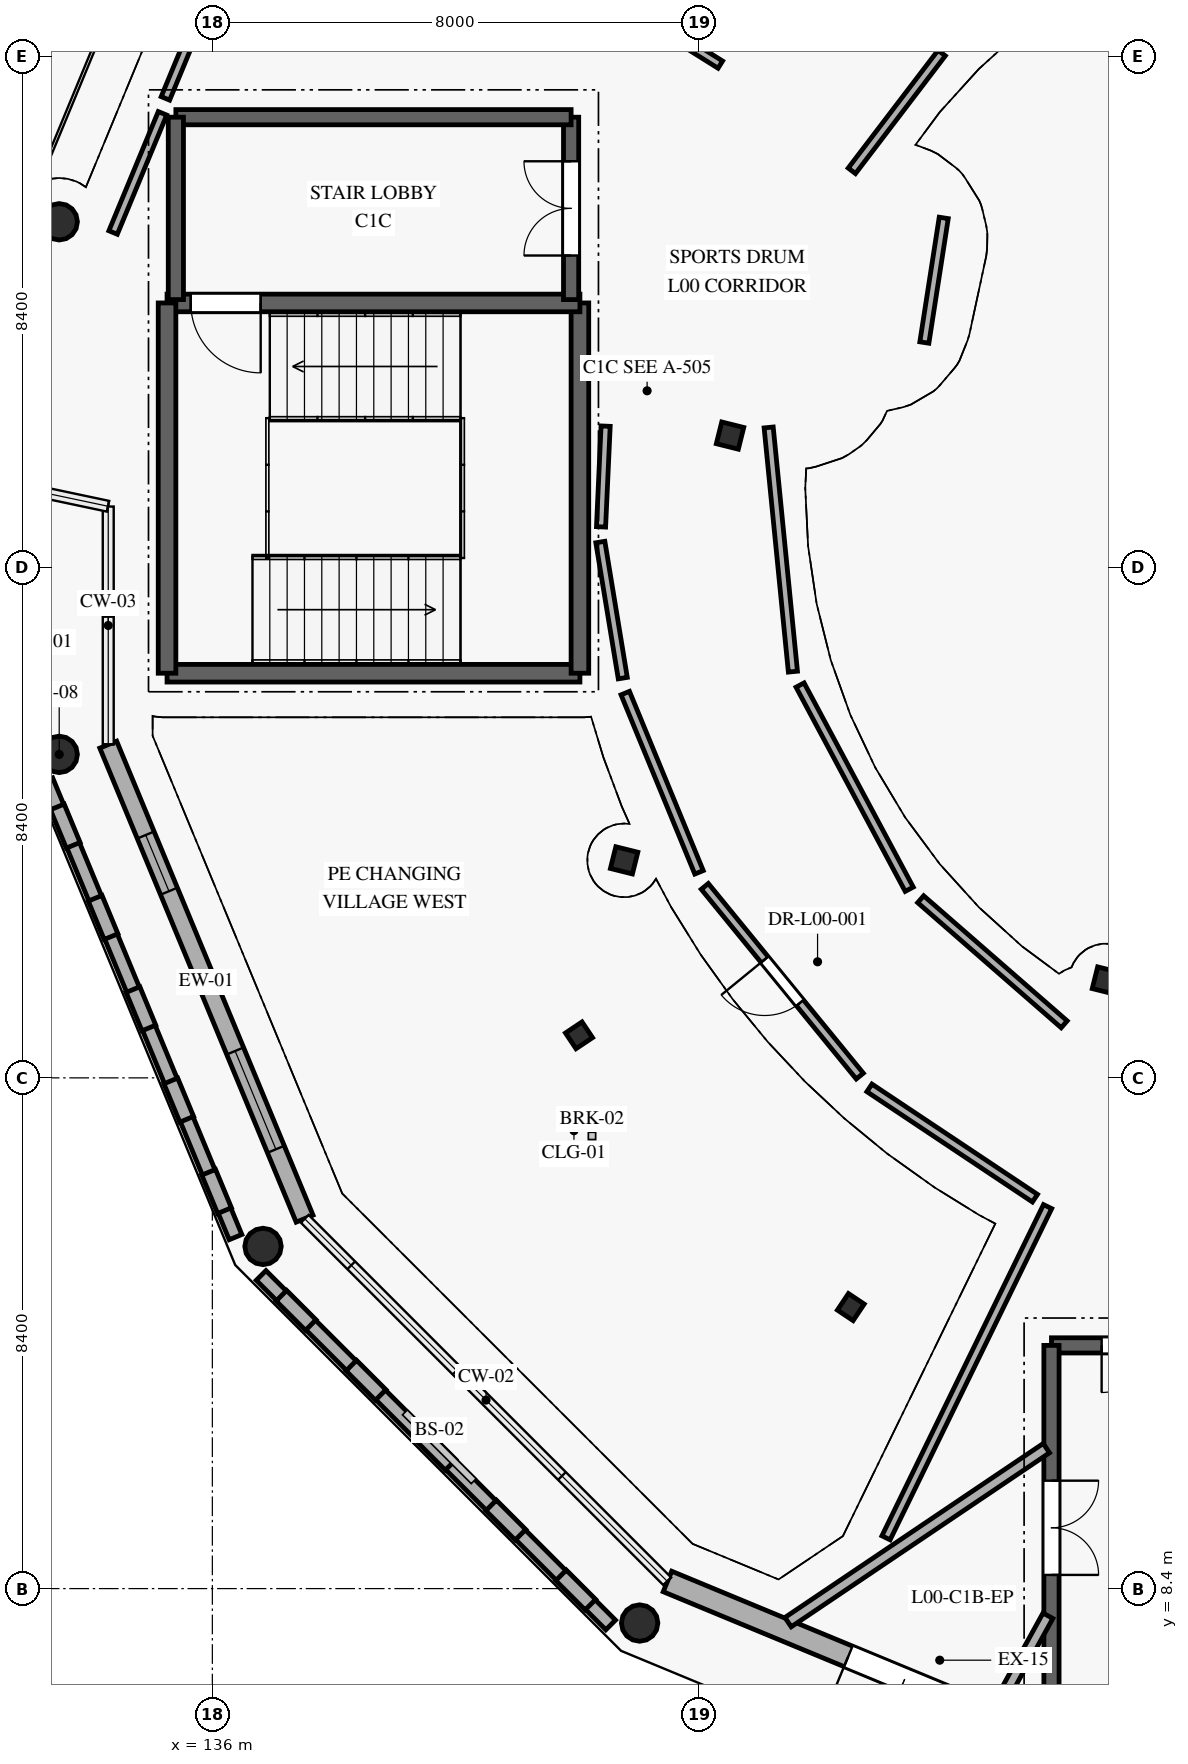
"""IFC4 building model, lengths in metres.
Left out: names, types, materials, properties, quantities, classifications, styles, units other than length and angle.
Written with IfcOpenShell. Run it as: python <this file> out.ifc"""

import sys

from ifc_helpers import new_model, si_unit, direction, frame, frame_2d, origin, origin_2d, place, context, subcontext, project, spatial, rectangle, circle, i_section, extrude, element, fill, save


model = new_model("IFC4")
c1 = context("Model", 3, precision=1e-05, world=origin(), true_north=direction((0.0, 1.0)))
c2 = subcontext(c1, "Body", "Model", "MODEL_VIEW")
j1 = project(units=[si_unit("LENGTHUNIT", "METRE"), si_unit("PLANEANGLEUNIT", "RADIAN")], contexts=[c1])
p1 = place(None, origin())
s1 = spatial("IfcSite", under=j1, at=p1, CompositionType="ELEMENT")
p2 = place(p1, origin())
s2 = spatial("IfcBuilding", under=s1, at=p2, CompositionType="ELEMENT")
p3 = place(p2, origin())
s3 = spatial("IfcBuildingStorey", under=s2, at=p3, CompositionType="ELEMENT", Elevation=0.0)
for number, where, z_axis, x_axis in (
    (1, (142.772, 20.377, 0.0), (0.0, 0.0, 1.0), (0.97, -0.242, 0.0)),
    (2, (144.514, 27.364, 0.0), (0.0, 0.0, 1.0), (0.97, -0.242, 0.0)),
    (3, (150.696, 18.402, 0.0), (0.0, 0.0, 1.0), (0.97, -0.242, 0.0)),
):
    element("IfcColumn", number, at=place(p3, frame(where, z_axis=z_axis, x_axis=x_axis)), inside=s3, PredefinedType="COLUMN", context=c2, shape_type="SweptSolid", body=[
        extrude(i_section(OverallWidth=0.373, OverallDepth=0.368, WebThickness=0.014, FlangeThickness=0.024, FilletRadius=0.015, at=origin_2d()), origin(), (0.0, 0.0, 1.0), 4.2),
    ])
for number, where, z_axis, x_axis in (
    (4, (133.481, 30.88, 0.0), (0.0, 0.0, 1.0), (-0.195, -0.981, 0.0)),
    (5, (133.481, 22.12, 0.0), (0.0, 0.0, 1.0), (0.195, -0.981, 0.0)),
    (6, (136.833, 14.027, 0.0), (0.0, 0.0, 1.0), (0.556, -0.831, 0.0)),
    (7, (143.027, 7.833, 0.0), (0.0, 0.0, 1.0), (0.831, -0.556, 0.0)),
):
    element("IfcColumn", number, at=place(p3, frame(where, z_axis=z_axis, x_axis=x_axis)), inside=s3, PredefinedType="COLUMN", context=c2, shape_type="SweptSolid", body=[
        extrude(circle(Radius=0.3, at=origin_2d()), origin(), (0.0, 0.0, 1.0), 4.2),
    ])
for number, where, z_axis, x_axis in (
    (8, (142.03, 17.5, 0.0), (0.0, 0.0, 1.0), (0.556, -0.831, 0.0)),
    (9, (146.5, 13.03, 0.0), (0.0, 0.0, 1.0), (0.831, -0.556, 0.0)),
):
    element("IfcColumn", number, at=place(p3, frame(where, z_axis=z_axis, x_axis=x_axis)), inside=s3, PredefinedType="COLUMN", context=c2, shape_type="SweptSolid", body=[
        extrude(i_section(OverallWidth=0.311, OverallDepth=0.327, WebThickness=0.016, FlangeThickness=0.025, FilletRadius=0.015, at=origin_2d()), origin(), (0.0, 0.0, 1.0), 4.2),
    ])
p4 = place(p3, frame((151.281, 5.288, 0.0), z_axis=(0.0, 0.0, 1.0), x_axis=(-0.923884604839, 0.382671186453, 0.0)))
e10 = element("IfcWall", 10, at=p4, inside=s3, PredefinedType="SOLIDWALL", context=c2, shape_type="SweptSolid", body=[
    extrude(rectangle(XDim=8.439, YDim=0.365, at=frame_2d((4.219, 0.0))), origin(), (0.0, 0.0, 1.0), 3.94),
])
p5 = place(p4, frame((3.219, 0.0, 0.0)))
e11 = element("IfcOpeningElement", 11, at=p5, cuts=e10, PredefinedType="OPENING", context=c2, shape_type="SweptSolid", body=[
    extrude(rectangle(XDim=2.0, YDim=2.2, at=frame_2d((1.0, 1.1))), frame((0.0, 0.192, 0.0), z_axis=(0.0, -1.0, 0.0), x_axis=(1.0, 0.0, 0.0)), (0.0, 0.0, 1.0), 0.385),
])
p6 = place(p3, frame((137.517, 14.484, 0.0), z_axis=(0.0, 0.0, 1.0), x_axis=(-0.382671186453, 0.923884604839, 0.0)))
e12 = element("IfcWall", 12, at=p6, inside=s3, PredefinedType="SOLIDWALL", context=c2, shape_type="SweptSolid", body=[
    extrude(rectangle(XDim=8.439, YDim=0.3, at=frame_2d((4.219, 0.0))), origin(), (0.0, 0.0, 1.0), 3.94),
])
p7 = place(p6, frame((1.235, 0.0, 0.85)))
e13 = element("IfcOpeningElement", 13, at=p7, cuts=e12, PredefinedType="OPENING", context=c2, shape_type="SweptSolid", body=[
    extrude(rectangle(XDim=1.75, YDim=1.3, at=frame_2d((0.875, 0.65))), frame((0.0, 0.16, 0.0), z_axis=(0.0, -1.0, 0.0), x_axis=(1.0, 0.0, 0.0)), (0.0, 0.0, 1.0), 0.32),
])
p8 = place(p6, frame((5.829, 0.0, 0.85)))
e14 = element("IfcOpeningElement", 14, at=p8, cuts=e12, PredefinedType="OPENING", context=c2, shape_type="SweptSolid", body=[
    extrude(rectangle(XDim=1.0, YDim=1.3, at=frame_2d((0.5, 0.65))), frame((0.0, 0.16, 0.0), z_axis=(0.0, -1.0, 0.0), x_axis=(1.0, 0.0, 0.0)), (0.0, 0.0, 1.0), 0.32),
])
p9 = place(p3, frame((133.27, 21.692, 0.0), z_axis=(0.0, 0.0, 1.0), x_axis=(0.382701881142, -0.923871890562, 0.0)))
e15 = element("IfcWall", 15, at=p9, inside=s3, PredefinedType="ELEMENTEDWALL", context=c2, shape_type="SweptSolid", body=[
    extrude(rectangle(XDim=8.13, YDim=0.225, at=frame_2d((4.065, 0.0))), origin(), (0.0, 0.0, 1.0), 0.55),
])
for number, where, z_axis, x_axis in (
    (16, (133.45, 21.256, 0.55), (0.0, 0.0, 1.0), (0.383, -0.924, 0.0)),
    (17, (134.073, 19.754, 0.55), (0.0, 0.0, 1.0), (0.382, -0.924, 0.0)),
    (18, (134.695, 18.252, 0.55), (0.0, 0.0, 1.0), (0.383, -0.924, 0.0)),
    (19, (135.317, 16.75, 0.55), (0.0, 0.0, 1.0), (0.383, -0.924, 0.0)),
    (20, (135.939, 15.247, 0.55), (0.0, 0.0, 1.0), (0.383, -0.924, 0.0)),
):
    element("IfcWall", number, at=place(p3, frame(where, z_axis=z_axis, x_axis=x_axis)), inside=s3, PredefinedType="ELEMENTEDWALL", context=c2, shape_type="SweptSolid", body=[
        extrude(rectangle(XDim=0.683, YDim=0.245, at=frame_2d((0.342, 0.0))), origin(), (0.0, 0.0, 1.0), 3.39),
    ])
p10 = place(p3, frame((136.802, 13.551, 0.0), z_axis=(0.0, 0.0, 1.0), x_axis=(0.707106781187, -0.707106781187, 0.0)))
e21 = element("IfcWall", 21, at=p10, inside=s3, PredefinedType="ELEMENTEDWALL", context=c2, shape_type="SweptSolid", body=[
    extrude(rectangle(XDim=8.13, YDim=0.225, at=frame_2d((4.065, 0.0))), origin(), (0.0, 0.0, 1.0), 0.55),
])
for number, where, z_axis, x_axis in (
    (22, (137.135, 13.217, 0.55), (0.0, 0.0, 1.0), (0.707, -0.707, 0.0)),
    (23, (138.285, 12.067, 0.55), (0.0, 0.0, 1.0), (0.707, -0.707, 0.0)),
    (24, (139.435, 10.918, 0.55), (0.0, 0.0, 1.0), (0.707, -0.707, 0.0)),
    (25, (140.585, 9.768, 0.55), (0.0, 0.0, 1.0), (0.707, -0.707, 0.0)),
    (26, (141.734, 8.618, 0.55), (0.0, 0.0, 1.0), (0.707, -0.707, 0.0)),
):
    element("IfcWall", number, at=place(p3, frame(where, z_axis=z_axis, x_axis=x_axis)), inside=s3, PredefinedType="ELEMENTEDWALL", context=c2, shape_type="SweptSolid", body=[
        extrude(rectangle(XDim=0.683, YDim=0.245, at=frame_2d((0.341, 0.0))), origin(), (0.0, 0.0, 1.0), 3.39),
    ])
p11 = place(p3, frame((153.0, 12.4, 0.0), z_axis=(0.0, 0.0, 1.0), x_axis=(-1.0, 0.0, 0.0)))
e27 = element("IfcWall", 27, at=p11, inside=s3, PredefinedType="SHEAR", context=c2, shape_type="SweptSolid", body=[
    extrude(rectangle(XDim=3.2, YDim=0.25, at=frame_2d((1.6, 0.0))), origin(), (0.0, 0.0, 1.0), 3.95),
])
p12 = place(p11, frame((0.825, 0.0, 0.0)))
e28 = element("IfcOpeningElement", 28, at=p12, cuts=e27, PredefinedType="OPENING", context=c2, shape_type="SweptSolid", body=[
    extrude(rectangle(XDim=1.55, YDim=2.15, at=frame_2d((0.775, 1.075))), frame((0.0, 0.135, 0.0), z_axis=(0.0, -1.0, 0.0), x_axis=(1.0, 0.0, 0.0)), (0.0, 0.0, 1.0), 0.27),
])
p13 = place(p3, frame((149.8, 12.4, 0.0), z_axis=(0.0, 0.0, 1.0), x_axis=(0.0, -1.0, 0.0)))
e29 = element("IfcWall", 29, at=p13, inside=s3, PredefinedType="SHEAR", context=c2, shape_type="SweptSolid", body=[
    extrude(rectangle(XDim=6.0, YDim=0.25, at=frame_2d((3.0, 0.0))), origin(), (0.0, 0.0, 1.0), 3.95),
])
p14 = place(p13, frame((2.225, 0.0, 0.0)))
e30 = element("IfcOpeningElement", 30, at=p14, cuts=e29, PredefinedType="OPENING", context=c2, shape_type="SweptSolid", body=[
    extrude(rectangle(XDim=1.55, YDim=2.15, at=frame_2d((0.775, 1.075))), frame((0.0, 0.135, 0.0), z_axis=(0.0, -1.0, 0.0), x_axis=(1.0, 0.0, 0.0)), (0.0, 0.0, 1.0), 0.27),
])
p15 = place(p3, frame((135.255, 23.455, 0.0), z_axis=(0.0, 0.0, 1.0), x_axis=(1.0, 0.0, 0.0)))
e31 = element("IfcWall", 31, at=p15, inside=s3, PredefinedType="SHEAR", context=c2, shape_type="SweptSolid", body=[
    extrude(rectangle(XDim=6.79, YDim=0.29, at=frame_2d((3.395, 0.0))), origin(), (0.0, 0.0, 1.0), 3.95),
])
p16 = place(p3, frame((142.045, 23.455, 0.0), z_axis=(0.0, 0.0, 1.0), x_axis=(0.0, 1.0, 0.0)))
e32 = element("IfcWall", 32, at=p16, inside=s3, PredefinedType="SHEAR", context=c2, shape_type="SweptSolid", body=[
    extrude(rectangle(XDim=6.09, YDim=0.29, at=frame_2d((3.045, 0.0))), origin(), (0.0, 0.0, 1.0), 3.95),
])
p17 = place(p3, frame((142.045, 29.545, 0.0), z_axis=(0.0, 0.0, 1.0), x_axis=(-1.0, 0.0, 0.0)))
e33 = element("IfcWall", 33, at=p17, inside=s3, PredefinedType="SHEAR", context=c2, shape_type="SweptSolid", body=[
    extrude(rectangle(XDim=6.79, YDim=0.29, at=frame_2d((3.395, 0.0))), origin(), (0.0, 0.0, 1.0), 3.95),
])
p18 = place(p17, frame((5.25, 0.0, 0.0)))
e34 = element("IfcOpeningElement", 34, at=p18, cuts=e33, PredefinedType="OPENING", context=c2, shape_type="SweptSolid", body=[
    extrude(rectangle(XDim=1.15, YDim=2.1, at=frame_2d((0.575, 1.05))), frame((0.0, 0.155, 0.0), z_axis=(0.0, -1.0, 0.0), x_axis=(1.0, 0.0, 0.0)), (0.0, 0.0, 1.0), 0.31),
])
p19 = place(p3, frame((135.255, 29.545, 0.0), z_axis=(0.0, 0.0, 1.0), x_axis=(0.0, -1.0, 0.0)))
e35 = element("IfcWall", 35, at=p19, inside=s3, PredefinedType="SHEAR", context=c2, shape_type="SweptSolid", body=[
    extrude(rectangle(XDim=6.09, YDim=0.29, at=frame_2d((3.045, 0.0))), origin(), (0.0, 0.0, 1.0), 3.95),
])
p20 = place(p3, frame((141.9, 29.6, 0.0), z_axis=(0.0, 0.0, 1.0), x_axis=(0.0, 1.0, 0.0)))
e36 = element("IfcWall", 36, at=p20, inside=s3, PredefinedType="SHEAR", context=c2, shape_type="SweptSolid", body=[
    extrude(rectangle(XDim=3.0, YDim=0.25, at=frame_2d((1.5, 0.0))), origin(), (0.0, 0.0, 1.0), 3.95),
])
p21 = place(p20, frame((0.725, 0.0, 0.0)))
e37 = element("IfcOpeningElement", 37, at=p21, cuts=e36, PredefinedType="OPENING", context=c2, shape_type="SweptSolid", body=[
    extrude(rectangle(XDim=1.55, YDim=2.15, at=frame_2d((0.775, 1.075))), frame((0.0, 0.135, 0.0), z_axis=(0.0, -1.0, 0.0), x_axis=(1.0, 0.0, 0.0)), (0.0, 0.0, 1.0), 0.27),
])
p22 = place(p3, frame((141.9, 32.6, 0.0), z_axis=(0.0, 0.0, 1.0), x_axis=(-1.0, 0.0, 0.0)))
e38 = element("IfcWall", 38, at=p22, inside=s3, PredefinedType="SHEAR", context=c2, shape_type="SweptSolid", body=[
    extrude(rectangle(XDim=6.5, YDim=0.25, at=frame_2d((3.25, 0.0))), origin(), (0.0, 0.0, 1.0), 3.95),
])
p23 = place(p3, frame((135.4, 32.6, 0.0), z_axis=(0.0, 0.0, 1.0), x_axis=(0.0, -1.0, 0.0)))
e39 = element("IfcWall", 39, at=p23, inside=s3, PredefinedType="SHEAR", context=c2, shape_type="SweptSolid", body=[
    extrude(rectangle(XDim=3.0, YDim=0.25, at=frame_2d((1.5, 0.0))), origin(), (0.0, 0.0, 1.0), 3.95),
])
p24 = place(p3, frame((149.716, 10.71, 0.0), z_axis=(0.0, 0.0, 1.0), x_axis=(-0.829326933292, -0.55876366893, 0.0)))
e40 = element("IfcWall", 40, at=p24, inside=s3, PredefinedType="PARTITIONING", context=c2, shape_type="SweptSolid", body=[
    extrude(rectangle(XDim=5.122, YDim=0.185, at=frame_2d((2.561, 0.0))), origin(), (0.0, 0.0, 1.0), 3.915),
])
p25 = place(p3, frame((148.917, 6.458, 0.0), z_axis=(0.0, 0.0, 1.0), x_axis=(0.48271443194, 0.875777812688, 0.0)))
e41 = element("IfcWall", 41, at=p25, inside=s3, PredefinedType="PARTITIONING", context=c2, shape_type="SweptSolid", body=[
    extrude(rectangle(XDim=1.708, YDim=0.185, at=frame_2d((0.854, 0.0))), origin(), (0.0, 0.0, 1.0), 3.915),
])
p26 = place(p3, frame((147.079, 9.235, 0.0), z_axis=(0.0, 0.0, 1.0), x_axis=(0.438378395159, 0.898790510997, 0.0)))
e42 = element("IfcWall", 42, at=p26, inside=s3, PredefinedType="PARTITIONING", context=c2, shape_type="SweptSolid", body=[
    extrude(rectangle(XDim=6.061, YDim=0.15, at=frame_2d((3.031, 0.0))), origin(), (0.0, 0.0, 1.0), 3.915),
])
p27 = place(p3, frame((149.528, 14.821, 0.0), z_axis=(0.0, 0.0, 1.0), x_axis=(-0.832084732615, 0.554648535335, 0.0)))
e43 = element("IfcWall", 43, at=p27, inside=s3, PredefinedType="PARTITIONING", context=c2, shape_type="SweptSolid", body=[
    extrude(rectangle(XDim=3.272, YDim=0.15, at=frame_2d((1.636, 0.0))), origin(), (0.0, 0.0, 1.0), 3.915),
])
p28 = place(p3, frame((146.648, 16.829, 0.0), z_axis=(0.0, 0.0, 1.0), x_axis=(-0.632643622902, 0.774443055622, 0.0)))
e44 = element("IfcWall", 44, at=p28, inside=s3, PredefinedType="PARTITIONING", context=c2, shape_type="SweptSolid", body=[
    extrude(rectangle(XDim=4.029, YDim=0.15, at=frame_2d((2.014, 0.0))), origin(), (0.0, 0.0, 1.0), 3.915),
])
p29 = place(p28, frame((1.555, 0.0, 0.0)))
e45 = element("IfcOpeningElement", 45, at=p29, cuts=e44, PredefinedType="OPENING", context=c2, shape_type="SweptSolid", body=[
    extrude(rectangle(XDim=0.92, YDim=2.08, at=frame_2d((0.46, 1.04))), frame((0.0, 0.085, 0.0), z_axis=(0.0, -1.0, 0.0), x_axis=(1.0, 0.0, 0.0)), (0.0, 0.0, 1.0), 0.17),
])
p30 = place(p3, frame((144.004, 20.18, 0.0), z_axis=(0.0, 0.0, 1.0), x_axis=(-0.380576451037, 0.92474946062, 0.0)))
e46 = element("IfcWall", 46, at=p30, inside=s3, PredefinedType="PARTITIONING", context=c2, shape_type="SweptSolid", body=[
    extrude(rectangle(XDim=3.188, YDim=0.15, at=frame_2d((1.594, 0.0))), origin(), (0.0, 0.0, 1.0), 3.915),
])
p31 = place(p3, frame((142.75, 23.375, 0.0), z_axis=(0.0, 0.0, 1.0), x_axis=(-0.16274062978, 0.986668884388, 0.0)))
e47 = element("IfcWall", 47, at=p31, inside=s3, PredefinedType="PARTITIONING", context=c2, shape_type="SweptSolid", body=[
    extrude(rectangle(XDim=2.268, YDim=0.15, at=frame_2d((1.134, 0.0))), origin(), (0.0, 0.0, 1.0), 3.915),
])
p32 = place(p3, frame((142.392, 25.862, 0.0), z_axis=(0.0, 0.0, 1.0), x_axis=(0.045641406821, 0.998957887993, 0.0)))
e48 = element("IfcWall", 48, at=p32, inside=s3, PredefinedType="PARTITIONING", context=c2, shape_type="SweptSolid", body=[
    extrude(rectangle(XDim=1.658, YDim=0.15, at=frame_2d((0.829, 0.0))), origin(), (0.0, 0.0, 1.0), 3.915),
])
p33 = place(p3, frame((135.18, 32.664, 0.0), z_axis=(0.0, 0.0, 1.0), x_axis=(-0.382629511238, -0.92390186553, 0.0)))
e49 = element("IfcWall", 49, at=p33, inside=s3, PredefinedType="PARTITIONING", context=c2, shape_type="SweptSolid", body=[
    extrude(rectangle(XDim=2.122, YDim=0.15, at=frame_2d((1.061, 0.0))), origin(), (0.0, 0.0, 1.0), 3.915),
])
p34 = place(p3, frame((137.446, 37.781, 0.0), z_axis=(0.0, 0.0, 1.0), x_axis=(0.848052179613, -0.529912729281, 0.0)))
e50 = element("IfcWall", 50, at=p34, inside=s3, PredefinedType="PLUMBINGWALL", context=c2, shape_type="SweptSolid", body=[
    extrude(rectangle(XDim=8.146, YDim=0.14, at=frame_2d((4.073, 0.0))), origin(), (0.0, 0.0, 1.0), 3.915),
])
p35 = place(p34, frame((2.494, 0.0, 0.0)))
e51 = element("IfcOpeningElement", 51, at=p35, cuts=e50, PredefinedType="OPENING", context=c2, shape_type="SweptSolid", body=[
    extrude(rectangle(XDim=1.02, YDim=2.06, at=frame_2d((0.51, 1.03))), frame((0.0, 0.08, 0.0), z_axis=(0.0, -1.0, 0.0), x_axis=(1.0, 0.0, 0.0)), (0.0, 0.0, 1.0), 0.16),
])
p36 = place(p3, frame((147.995, 33.655, 0.0), z_axis=(0.0, 0.0, 1.0), x_axis=(-0.606441659599, -0.795127985611, 0.0)))
e52 = element("IfcWall", 52, at=p36, inside=s3, PredefinedType="PARTITIONING", context=c2, shape_type="SweptSolid", body=[
    extrude(rectangle(XDim=2.437, YDim=0.15, at=frame_2d((1.218, 0.0))), origin(), (0.0, 0.0, 1.0), 3.915),
])
p37 = place(p3, frame((148.028, 30.944, 0.0), z_axis=(0.0, 0.0, 1.0), x_axis=(-0.153604850803, -0.988132354399, 0.0)))
e53 = element("IfcWall", 53, at=p37, inside=s3, PredefinedType="PARTITIONING", context=c2, shape_type="SweptSolid", body=[
    extrude(rectangle(XDim=2.074, YDim=0.15, at=frame_2d((1.037, 0.0))), origin(), (0.0, 0.0, 1.0), 3.915),
])
p38 = place(p3, frame((145.149, 27.497, 0.0), z_axis=(0.0, 0.0, 1.0), x_axis=(0.098844867188, -0.995102855101, 0.0)))
e54 = element("IfcWall", 54, at=p38, inside=s3, PredefinedType="PARTITIONING", context=c2, shape_type="SweptSolid", body=[
    extrude(rectangle(XDim=4.036, YDim=0.15, at=frame_2d((2.018, 0.0))), origin(), (0.0, 0.0, 1.0), 3.915),
])
p39 = place(p3, frame((145.666, 23.26, 0.0), z_axis=(0.0, 0.0, 1.0), x_axis=(0.471436596753, -0.881899957615, 0.0)))
e55 = element("IfcWall", 55, at=p39, inside=s3, PredefinedType="PARTITIONING", context=c2, shape_type="SweptSolid", body=[
    extrude(rectangle(XDim=3.808, YDim=0.15, at=frame_2d((1.904, 0.0))), origin(), (0.0, 0.0, 1.0), 3.915),
])
p40 = place(p3, frame((147.649, 19.738, 0.0), z_axis=(0.0, 0.0, 1.0), x_axis=(0.753758865397, -0.657151103503, 0.0)))
e56 = element("IfcWall", 56, at=p40, inside=s3, PredefinedType="PARTITIONING", context=c2, shape_type="SweptSolid", body=[
    extrude(rectangle(XDim=3.131, YDim=0.15, at=frame_2d((1.565, 0.0))), origin(), (0.0, 0.0, 1.0), 3.915),
])
p41 = place(p3, frame((135.228, 32.909, 0.0), z_axis=(0.0, 0.0, 1.0), x_axis=(0.382528310119, 0.923943770993, 0.0)))
e57 = element("IfcWall", 57, at=p41, inside=s3, PredefinedType="PARTITIONING", context=c2, shape_type="SweptSolid", body=[
    extrude(rectangle(XDim=2.443, YDim=0.15, at=frame_2d((1.222, 0.0))), origin(), (0.0, 0.0, 1.0), 3.915),
])
p42 = place(p5, origin())
e58 = element("IfcDoor", 58, at=p42, inside=s3, OperationType="DOUBLE_DOOR_SINGLE_SWING", PredefinedType="DOOR", context=c2, shape_type="SweptSolid", body=[
    extrude(rectangle(XDim=2.0, YDim=2.2, at=frame_2d((1.0, 1.1))), frame((0.0, 0.025, 0.0), z_axis=(0.0, -1.0, 0.0), x_axis=(1.0, 0.0, 0.0)), (0.0, 0.0, 1.0), 0.05),
])
fill(e11, e58)
p43 = place(p7, origin())
e59 = element("IfcWindow", 59, at=p43, inside=s3, PartitioningType="SINGLE_PANEL", PredefinedType="WINDOW", context=c2, shape_type="SweptSolid", body=[
    extrude(rectangle(XDim=1.75, YDim=1.3, at=frame_2d((0.875, 0.65))), frame((0.0, 0.03, 0.0), z_axis=(0.0, -1.0, 0.0), x_axis=(1.0, 0.0, 0.0)), (0.0, 0.0, 1.0), 0.06),
])
fill(e13, e59)
p44 = place(p8, origin())
e60 = element("IfcWindow", 60, at=p44, inside=s3, PartitioningType="SINGLE_PANEL", PredefinedType="WINDOW", context=c2, shape_type="SweptSolid", body=[
    extrude(rectangle(XDim=1.0, YDim=1.3, at=frame_2d((0.5, 0.65))), frame((0.0, 0.03, 0.0), z_axis=(0.0, -1.0, 0.0), x_axis=(1.0, 0.0, 0.0)), (0.0, 0.0, 1.0), 0.06),
])
fill(e14, e60)
p45 = place(p12, frame((1.55, 0.0, 0.0), z_axis=(0.0, 0.0, 1.0), x_axis=(-1.0, 0.0, 0.0)))
e61 = element("IfcDoor", 61, at=p45, inside=s3, OperationType="DOUBLE_DOOR_SINGLE_SWING", PredefinedType="DOOR", context=c2, shape_type="SweptSolid", body=[
    extrude(rectangle(XDim=1.55, YDim=2.15, at=frame_2d((0.775, 1.075))), frame((0.0, 0.025, 0.0), z_axis=(0.0, -1.0, 0.0), x_axis=(1.0, 0.0, 0.0)), (0.0, 0.0, 1.0), 0.05),
])
fill(e28, e61)
p46 = place(p14, frame((1.55, 0.0, 0.0), z_axis=(0.0, 0.0, 1.0), x_axis=(-1.0, 0.0, 0.0)))
e62 = element("IfcDoor", 62, at=p46, inside=s3, OperationType="DOUBLE_DOOR_SINGLE_SWING", PredefinedType="DOOR", context=c2, shape_type="SweptSolid", body=[
    extrude(rectangle(XDim=1.55, YDim=2.15, at=frame_2d((0.775, 1.075))), frame((0.0, 0.025, 0.0), z_axis=(0.0, -1.0, 0.0), x_axis=(1.0, 0.0, 0.0)), (0.0, 0.0, 1.0), 0.05),
])
fill(e30, e62)
p47 = place(p18, frame((1.15, 0.0, 0.0), z_axis=(0.0, 0.0, 1.0), x_axis=(-1.0, 0.0, 0.0)))
e63 = element("IfcDoor", 63, at=p47, inside=s3, OperationType="SINGLE_SWING_LEFT", PredefinedType="DOOR", context=c2, shape_type="SweptSolid", body=[
    extrude(rectangle(XDim=1.15, YDim=2.1, at=frame_2d((0.575, 1.05))), frame((0.0, 0.025, 0.0), z_axis=(0.0, -1.0, 0.0), x_axis=(1.0, 0.0, 0.0)), (0.0, 0.0, 1.0), 0.05),
])
fill(e34, e63)
p48 = place(p21, frame((1.55, 0.0, 0.0), z_axis=(0.0, 0.0, 1.0), x_axis=(-1.0, 0.0, 0.0)))
e64 = element("IfcDoor", 64, at=p48, inside=s3, OperationType="DOUBLE_DOOR_SINGLE_SWING", PredefinedType="DOOR", context=c2, shape_type="SweptSolid", body=[
    extrude(rectangle(XDim=1.55, YDim=2.15, at=frame_2d((0.775, 1.075))), frame((0.0, 0.025, 0.0), z_axis=(0.0, -1.0, 0.0), x_axis=(1.0, 0.0, 0.0)), (0.0, 0.0, 1.0), 0.05),
])
fill(e37, e64)
p49 = place(p29, origin())
e65 = element("IfcDoor", 65, at=p49, inside=s3, OperationType="SINGLE_SWING_RIGHT", PredefinedType="DOOR", context=c2, shape_type="SweptSolid", body=[
    extrude(rectangle(XDim=0.92, YDim=2.08, at=frame_2d((0.46, 1.04))), frame((0.0, 0.025, 0.0), z_axis=(0.0, -1.0, 0.0), x_axis=(1.0, 0.0, 0.0)), (0.0, 0.0, 1.0), 0.05),
])
fill(e45, e65)
save(model, sys.argv[1])
